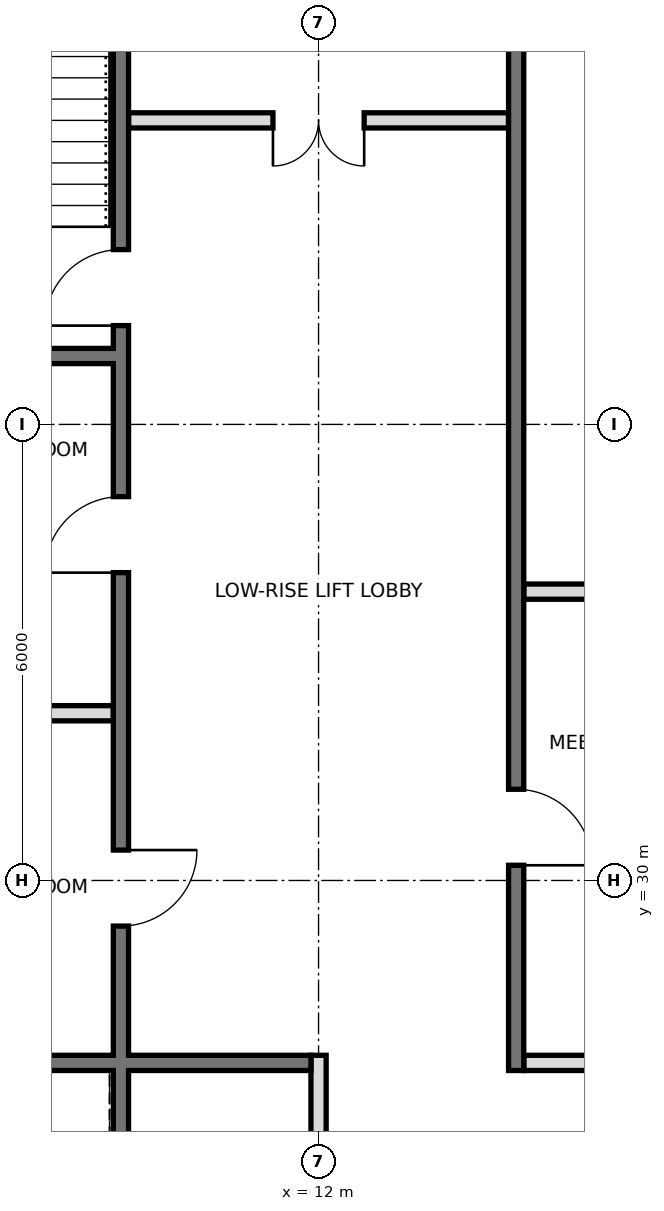
"""IFC4 building model, lengths in metres.
Left out: names, types, materials, properties, quantities, classifications, styles, units other than length and angle.
Written with IfcOpenShell. Run it as: python <this file> out.ifc"""

import sys

from ifc_helpers import new_model, si_unit, direction, frame, frame_2d, origin, place, context, subcontext, project, spatial, rectangle, extrude, element, fill, save


model = new_model("IFC4")
c1 = context("Model", 3, precision=1e-05, world=origin(), true_north=direction((0.0, 1.0)))
c2 = subcontext(c1, "Body", "Model", "MODEL_VIEW")
j1 = project(units=[si_unit("LENGTHUNIT", "METRE"), si_unit("PLANEANGLEUNIT", "RADIAN")], contexts=[c1])
p1 = place(None, origin())
s1 = spatial("IfcSite", under=j1, at=p1, CompositionType="ELEMENT")
p2 = place(p1, origin())
s2 = spatial("IfcBuilding", under=s1, at=p2, CompositionType="ELEMENT")
p3 = place(p2, frame((0.0, 0.0, 345.8)))
s3 = spatial("IfcBuildingStorey", under=s2, at=p3, CompositionType="ELEMENT", Elevation=345.8)
p4 = place(p3, frame((12.0, 21.5, 0.0), z_axis=(0.0, 0.0, 1.0), x_axis=(0.0, 1.0, 0.0)))
e1 = element("IfcWall", 1, at=p4, inside=s3, PredefinedType="PARTITIONING", context=c2, shape_type="SweptSolid", body=[
    extrude(rectangle(XDim=6.2, YDim=0.2, at=frame_2d((3.1, 0.0))), origin(), (0.0, 0.0, 1.0), 3.75),
])
p5 = place(p3, frame((14.6, 27.5, 0.0), z_axis=(0.0, 0.0, 1.0), x_axis=(0.0, 1.0, 0.0)))
e2 = element("IfcWall", 2, at=p5, inside=s3, PredefinedType="SOLIDWALL", context=c2, shape_type="SweptSolid", body=[
    extrude(rectangle(XDim=17.5, YDim=0.2, at=frame_2d((8.75, 0.0))), origin(), (0.0, 0.0, 1.0), 3.75),
])
p6 = place(p5, frame((15.4, 0.0, 0.0)))
e3 = element("IfcOpeningElement", 3, at=p6, cuts=e2, PredefinedType="OPENING", context=c2, shape_type="SweptSolid", body=[
    extrude(rectangle(XDim=1.1, YDim=2.1, at=frame_2d((0.55, 1.05))), frame((0.0, 0.11, 0.0), z_axis=(0.0, -1.0, 0.0), x_axis=(1.0, 0.0, 0.0)), (0.0, 0.0, 1.0), 0.22),
])
p7 = place(p5, frame((2.7, 0.0, 0.0)))
e4 = element("IfcOpeningElement", 4, at=p7, cuts=e2, PredefinedType="OPENING", context=c2, shape_type="SweptSolid", body=[
    extrude(rectangle(XDim=1.0, YDim=2.1, at=frame_2d((0.5, 1.05))), frame((0.0, 0.11, 0.0), z_axis=(0.0, -1.0, 0.0), x_axis=(1.0, 0.0, 0.0)), (0.0, 0.0, 1.0), 0.22),
])
p8 = place(p3, frame((9.4, 21.5, 0.0), z_axis=(0.0, 0.0, 1.0), x_axis=(0.0, 1.0, 0.0)))
e5 = element("IfcWall", 5, at=p8, inside=s3, PredefinedType="SOLIDWALL", context=c2, shape_type="SweptSolid", body=[
    extrude(rectangle(XDim=23.5, YDim=0.2, at=frame_2d((11.75, 0.0))), origin(), (0.0, 0.0, 1.0), 3.75),
])
p9 = place(p8, frame((7.9, 0.0, 0.0)))
e6 = element("IfcOpeningElement", 6, at=p9, cuts=e5, PredefinedType="OPENING", context=c2, shape_type="SweptSolid", body=[
    extrude(rectangle(XDim=1.0, YDim=2.1, at=frame_2d((0.5, 1.05))), frame((0.0, 0.11, 0.0), z_axis=(0.0, -1.0, 0.0), x_axis=(1.0, 0.0, 0.0)), (0.0, 0.0, 1.0), 0.22),
])
p10 = place(p8, frame((12.55, 0.0, 0.0)))
e7 = element("IfcOpeningElement", 7, at=p10, cuts=e5, PredefinedType="OPENING", context=c2, shape_type="SweptSolid", body=[
    extrude(rectangle(XDim=1.0, YDim=2.1, at=frame_2d((0.5, 1.05))), frame((0.0, 0.11, 0.0), z_axis=(0.0, -1.0, 0.0), x_axis=(1.0, 0.0, 0.0)), (0.0, 0.0, 1.0), 0.22),
])
p11 = place(p8, frame((15.8, 0.0, 0.0)))
e8 = element("IfcOpeningElement", 8, at=p11, cuts=e5, PredefinedType="OPENING", context=c2, shape_type="SweptSolid", body=[
    extrude(rectangle(XDim=1.0, YDim=2.1, at=frame_2d((0.5, 1.05))), frame((0.0, 0.11, 0.0), z_axis=(0.0, -1.0, 0.0), x_axis=(1.0, 0.0, 0.0)), (0.0, 0.0, 1.0), 0.22),
])
p12 = place(p8, frame((0.275, 0.0, 0.0)))
e9 = element("IfcOpeningElement", 9, at=p12, cuts=e5, PredefinedType="OPENING", context=c2, shape_type="SweptSolid", body=[
    extrude(rectangle(XDim=0.9, YDim=2.1, at=frame_2d((0.45, 1.05))), frame((0.0, 0.11, 0.0), z_axis=(0.0, -1.0, 0.0), x_axis=(1.0, 0.0, 0.0)), (0.0, 0.0, 1.0), 0.22),
])
p13 = place(p3, frame((14.7, 27.6, 0.0), z_axis=(0.0, 0.0, 1.0), x_axis=(1.0, 0.0, 0.0)))
e10 = element("IfcWall", 10, at=p13, inside=s3, PredefinedType="PARTITIONING", context=c2, shape_type="SweptSolid", body=[
    extrude(rectangle(XDim=2.7, YDim=0.2, at=frame_2d((1.35, 0.0))), origin(), (0.0, 0.0, 1.0), 3.75),
])
p14 = place(p3, frame((6.6, 27.6, 0.0), z_axis=(0.0, 0.0, 1.0), x_axis=(1.0, 0.0, 0.0)))
e11 = element("IfcWall", 11, at=p14, inside=s3, PredefinedType="SOLIDWALL", context=c2, shape_type="SweptSolid", body=[
    extrude(rectangle(XDim=5.3, YDim=0.2, at=frame_2d((2.65, 0.0))), origin(), (0.0, 0.0, 1.0), 3.75),
])
for number, where, z_axis, x_axis in (
    (12, (6.6, 32.2, 0.0), (0.0, 0.0, 1.0), (1.0, 0.0, 0.0)),
    (13, (14.7, 33.8, 0.0), (0.0, 0.0, 1.0), (1.0, 0.0, 0.0)),
):
    element("IfcWall", number, at=place(p3, frame(where, z_axis=z_axis, x_axis=x_axis)), inside=s3, PredefinedType="PARTITIONING", context=c2, shape_type="SweptSolid", body=[
        extrude(rectangle(XDim=2.7, YDim=0.2, at=frame_2d((1.35, 0.0))), origin(), (0.0, 0.0, 1.0), 3.75),
    ])
p15 = place(p3, frame((6.6, 36.9, 0.0), z_axis=(0.0, 0.0, 1.0), x_axis=(1.0, 0.0, 0.0)))
e14 = element("IfcWall", 14, at=p15, inside=s3, PredefinedType="SOLIDWALL", context=c2, shape_type="SweptSolid", body=[
    extrude(rectangle(XDim=2.7, YDim=0.2, at=frame_2d((1.35, 0.0))), origin(), (0.0, 0.0, 1.0), 3.75),
])
p16 = place(p3, frame((9.5, 40.0, 0.0), z_axis=(0.0, 0.0, 1.0), x_axis=(1.0, 0.0, 0.0)))
e15 = element("IfcWall", 15, at=p16, inside=s3, PredefinedType="PARTITIONING", context=c2, shape_type="SweptSolid", body=[
    extrude(rectangle(XDim=5.0, YDim=0.2, at=frame_2d((2.5, 0.0))), origin(), (0.0, 0.0, 1.0), 3.75),
])
p17 = place(p16, frame((1.9, 0.0, 0.0)))
e16 = element("IfcOpeningElement", 16, at=p17, cuts=e15, PredefinedType="OPENING", context=c2, shape_type="SweptSolid", body=[
    extrude(rectangle(XDim=1.2, YDim=2.1, at=frame_2d((0.6, 1.05))), frame((0.0, 0.11, 0.0), z_axis=(0.0, -1.0, 0.0), x_axis=(1.0, 0.0, 0.0)), (0.0, 0.0, 1.0), 0.22),
])
p18 = place(p17, frame((1.2, 0.0, 0.0), z_axis=(0.0, 0.0, 1.0), x_axis=(-1.0, 0.0, 0.0)))
e17 = element("IfcDoor", 17, at=p18, inside=s3, OperationType="DOUBLE_DOOR_SINGLE_SWING", PredefinedType="DOOR", context=c2, shape_type="SweptSolid", body=[
    extrude(rectangle(XDim=1.2, YDim=2.1, at=frame_2d((0.6, 1.05))), frame((0.0, 0.025, 0.0), z_axis=(0.0, -1.0, 0.0), x_axis=(1.0, 0.0, 0.0)), (0.0, 0.0, 1.0), 0.05),
])
fill(e16, e17)
p19 = place(p7, frame((1.0, 0.0, 0.0), z_axis=(0.0, 0.0, 1.0), x_axis=(-1.0, 0.0, 0.0)))
e18 = element("IfcDoor", 18, at=p19, inside=s3, OperationType="SINGLE_SWING_RIGHT", PredefinedType="DOOR", context=c2, shape_type="SweptSolid", body=[
    extrude(rectangle(XDim=1.0, YDim=2.1, at=frame_2d((0.5, 1.05))), frame((0.0, 0.025, 0.0), z_axis=(0.0, -1.0, 0.0), x_axis=(1.0, 0.0, 0.0)), (0.0, 0.0, 1.0), 0.05),
])
fill(e4, e18)
p20 = place(p9, origin())
e19 = element("IfcDoor", 19, at=p20, inside=s3, OperationType="SINGLE_SWING_RIGHT", PredefinedType="DOOR", context=c2, shape_type="SweptSolid", body=[
    extrude(rectangle(XDim=1.0, YDim=2.1, at=frame_2d((0.5, 1.05))), frame((0.0, 0.025, 0.0), z_axis=(0.0, -1.0, 0.0), x_axis=(1.0, 0.0, 0.0)), (0.0, 0.0, 1.0), 0.05),
])
fill(e6, e19)
p21 = place(p10, origin())
e20 = element("IfcDoor", 20, at=p21, inside=s3, OperationType="SINGLE_SWING_LEFT", PredefinedType="DOOR", context=c2, shape_type="SweptSolid", body=[
    extrude(rectangle(XDim=1.0, YDim=2.1, at=frame_2d((0.5, 1.05))), frame((0.0, 0.025, 0.0), z_axis=(0.0, -1.0, 0.0), x_axis=(1.0, 0.0, 0.0)), (0.0, 0.0, 1.0), 0.05),
])
fill(e7, e20)
p22 = place(p11, origin())
e21 = element("IfcDoor", 21, at=p22, inside=s3, OperationType="SINGLE_SWING_LEFT", PredefinedType="DOOR", context=c2, shape_type="SweptSolid", body=[
    extrude(rectangle(XDim=1.0, YDim=2.1, at=frame_2d((0.5, 1.05))), frame((0.0, 0.025, 0.0), z_axis=(0.0, -1.0, 0.0), x_axis=(1.0, 0.0, 0.0)), (0.0, 0.0, 1.0), 0.05),
])
fill(e8, e21)
save(model, sys.argv[1])
